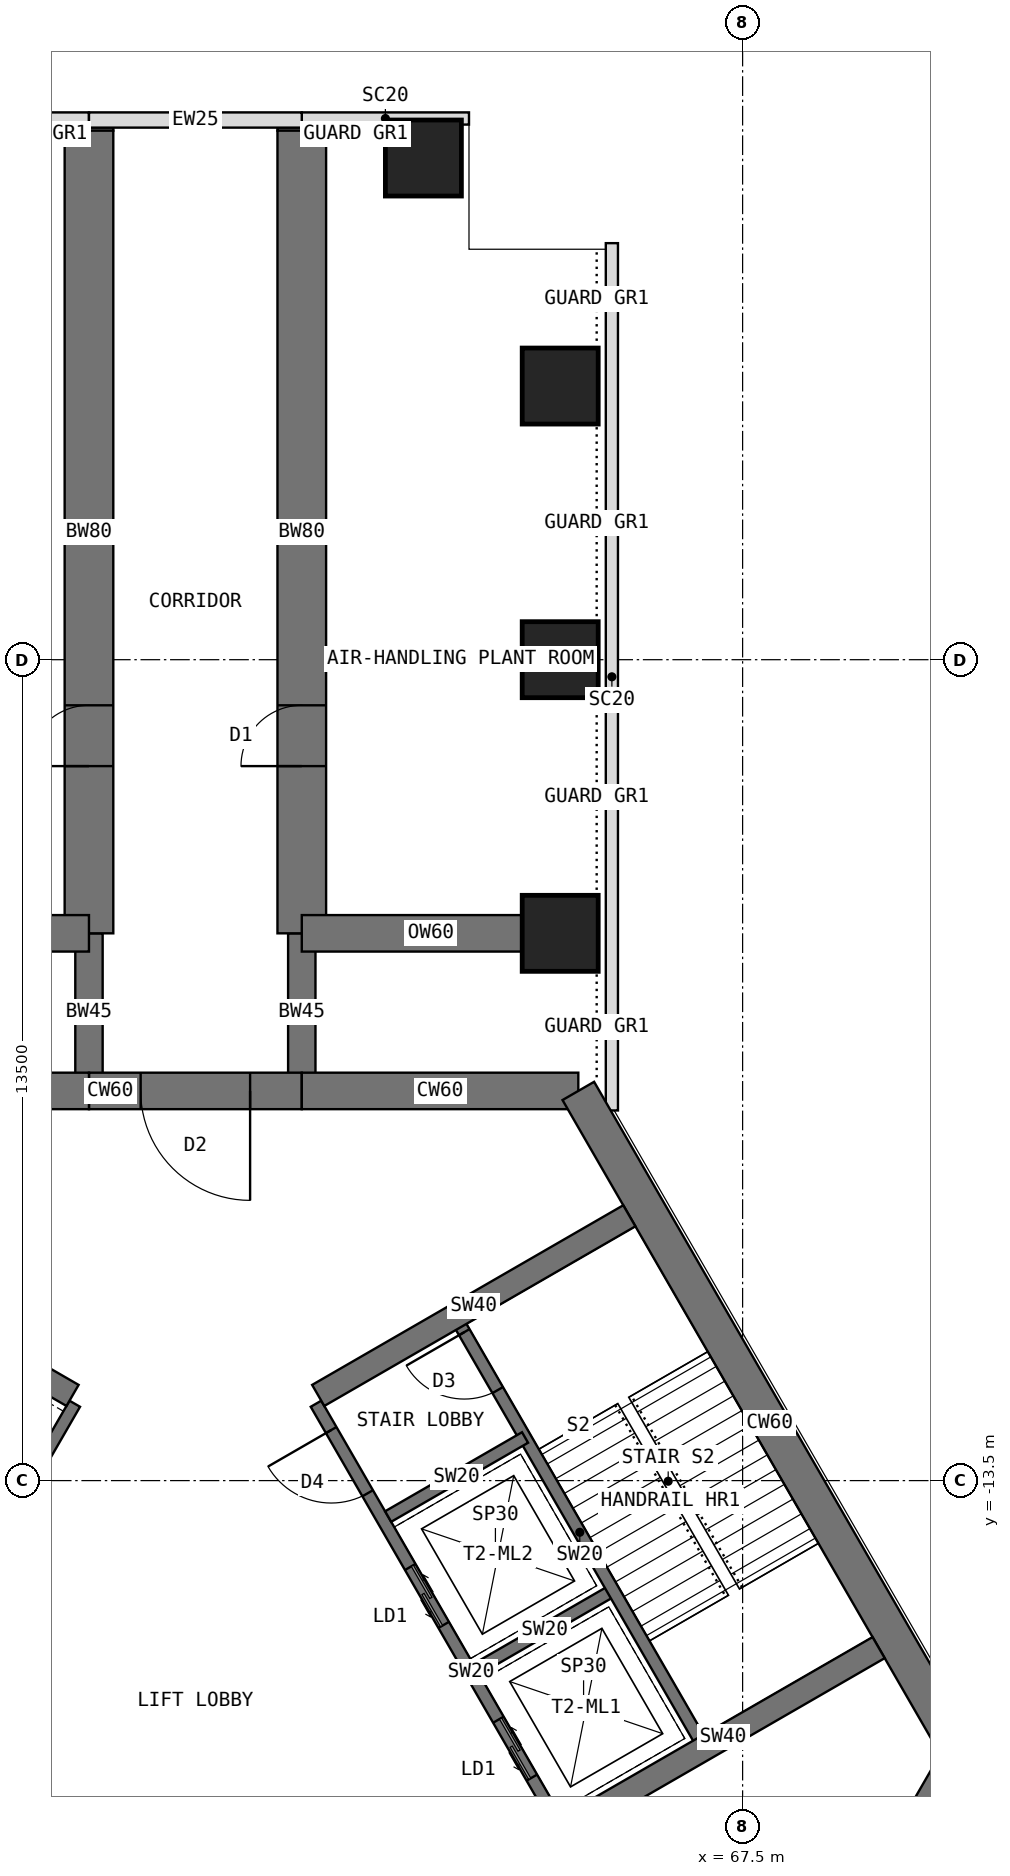
"""IFC4 building model, lengths in metres.
Left out: names, types, materials, properties, quantities, classifications, styles, units other than length and angle.
Written with IfcOpenShell. Run it as: python <this file> out.ifc"""

import sys

from ifc_helpers import new_model, si_unit, direction, frame, frame_2d, origin, origin_2d, place, context, subcontext, project, spatial, rectangle, extrude, element, fill, save


model = new_model("IFC4")
c1 = context("Model", 3, precision=1e-05, world=origin(), true_north=direction((0.0, 1.0)))
c2 = subcontext(c1, "Body", "Model", "MODEL_VIEW")
j1 = project(units=[si_unit("LENGTHUNIT", "METRE"), si_unit("PLANEANGLEUNIT", "RADIAN")], contexts=[c1])
p1 = place(None, origin())
s1 = spatial("IfcSite", under=j1, at=p1, CompositionType="ELEMENT")
p2 = place(p1, origin())
s2 = spatial("IfcBuilding", under=s1, at=p2, CompositionType="ELEMENT")
p3 = place(p2, frame((0.0, 0.0, 165.5)))
s3 = spatial("IfcBuildingStorey", under=s2, at=p3, CompositionType="ELEMENT", Elevation=165.5)
p4 = place(p3, frame((64.798, -7.092, 0.0), z_axis=(0.0, 0.0, 1.0), x_axis=(-1.0, 0.0, 0.0)))
e1 = element("IfcWall", 1, at=p4, inside=s3, PredefinedType="SHEAR", context=c2, shape_type="SweptSolid", body=[
    extrude(rectangle(XDim=4.548, YDim=0.6, at=frame_2d((2.274, 0.0))), origin(), (0.0, 0.0, 1.0), 5.0),
])
p5 = place(p3, frame((60.25, -7.092, 0.0), z_axis=(0.0, 0.0, 1.0), x_axis=(-1.0, 0.0, 0.0)))
e2 = element("IfcWall", 2, at=p5, inside=s3, PredefinedType="SHEAR", context=c2, shape_type="SweptSolid", body=[
    extrude(rectangle(XDim=3.5, YDim=0.6, at=frame_2d((1.75, 0.0))), origin(), (0.0, 0.0, 1.0), 5.0),
])
p6 = place(p5, frame((0.85, 0.0, 0.0)))
e3 = element("IfcOpeningElement", 3, at=p6, cuts=e2, PredefinedType="OPENING", context=c2, shape_type="SweptSolid", body=[
    extrude(rectangle(XDim=1.8, YDim=2.1, at=frame_2d((0.9, 1.05))), frame((0.0, 0.31, 0.0), z_axis=(0.0, -1.0, 0.0), x_axis=(1.0, 0.0, 0.0)), (0.0, 0.0, 1.0), 0.62),
])
p7 = place(p3, frame((56.75, -7.092, 0.0), z_axis=(0.0, 0.0, 1.0), x_axis=(-1.0, 0.0, 0.0)))
e4 = element("IfcWall", 4, at=p7, inside=s3, PredefinedType="SHEAR", context=c2, shape_type="SweptSolid", body=[
    extrude(rectangle(XDim=4.548, YDim=0.6, at=frame_2d((2.274, 0.0))), origin(), (0.0, 0.0, 1.0), 5.0),
])
p8 = place(p3, frame((68.822, -21.939, 0.0), z_axis=(0.0, 0.0, 1.0), x_axis=(0.500024481964, 0.866011268655, 0.0)))
e5 = element("IfcWall", 5, at=p8, inside=s3, PredefinedType="SHEAR", context=c2, shape_type="SweptSolid", body=[
    extrude(rectangle(XDim=4.548, YDim=0.6, at=frame_2d((2.274, 0.0))), origin(), (0.0, 0.0, 1.0), 5.0),
])
p9 = place(p3, frame((71.096, -18.0, 0.0), z_axis=(0.0, 0.0, 1.0), x_axis=(-0.500005998175, 0.866021940709, 0.0)))
e6 = element("IfcWall", 6, at=p9, inside=s3, PredefinedType="SHEAR", context=c2, shape_type="SweptSolid", body=[
    extrude(rectangle(XDim=12.596, YDim=0.6, at=frame_2d((6.298, 0.0))), origin(), (0.0, 0.0, 1.0), 5.0),
])
p10 = place(p3, frame((56.75, -7.092, 0.0), z_axis=(0.0, 0.0, 1.0), x_axis=(0.0, 1.0, 0.0)))
e7 = element("IfcWall", 7, at=p10, inside=s3, PredefinedType="SHEAR", context=c2, shape_type="SweptSolid", body=[
    extrude(rectangle(XDim=2.592, YDim=0.45, at=frame_2d((1.296, 0.0))), origin(), (0.0, 0.0, 1.0), 5.0),
])
p11 = place(p3, frame((56.75, -4.5, 0.0), z_axis=(0.0, 0.0, 1.0), x_axis=(0.0, 1.0, 0.0)))
e8 = element("IfcWall", 8, at=p11, inside=s3, PredefinedType="SHEAR", context=c2, shape_type="SweptSolid", body=[
    extrude(rectangle(XDim=13.2, YDim=0.8, at=frame_2d((6.6, 0.0))), origin(), (0.0, 0.0, 1.0), 5.0),
])
p12 = place(p11, frame((2.75, 0.0, 0.0)))
e9 = element("IfcOpeningElement", 9, at=p12, cuts=e8, PredefinedType="OPENING", context=c2, shape_type="SweptSolid", body=[
    extrude(rectangle(XDim=1.0, YDim=2.1, at=frame_2d((0.5, 1.05))), frame((0.0, 0.41, 0.0), z_axis=(0.0, -1.0, 0.0), x_axis=(1.0, 0.0, 0.0)), (0.0, 0.0, 1.0), 0.82),
])
p13 = place(p3, frame((60.25, -7.092, 0.0), z_axis=(0.0, 0.0, 1.0), x_axis=(0.0, 1.0, 0.0)))
e10 = element("IfcWall", 10, at=p13, inside=s3, PredefinedType="SHEAR", context=c2, shape_type="SweptSolid", body=[
    extrude(rectangle(XDim=2.592, YDim=0.45, at=frame_2d((1.296, 0.0))), origin(), (0.0, 0.0, 1.0), 5.0),
])
p14 = place(p3, frame((60.25, -4.5, 0.0), z_axis=(0.0, 0.0, 1.0), x_axis=(0.0, 1.0, 0.0)))
e11 = element("IfcWall", 11, at=p14, inside=s3, PredefinedType="SHEAR", context=c2, shape_type="SweptSolid", body=[
    extrude(rectangle(XDim=13.2, YDim=0.8, at=frame_2d((6.6, 0.0))), origin(), (0.0, 0.0, 1.0), 5.0),
])
p15 = place(p14, frame((2.75, 0.0, 0.0)))
e12 = element("IfcOpeningElement", 12, at=p15, cuts=e11, PredefinedType="OPENING", context=c2, shape_type="SweptSolid", body=[
    extrude(rectangle(XDim=1.0, YDim=2.1, at=frame_2d((0.5, 1.05))), frame((0.0, 0.41, 0.0), z_axis=(0.0, -1.0, 0.0), x_axis=(1.0, 0.0, 0.0)), (0.0, 0.0, 1.0), 0.82),
])
for number, where, z_axis, x_axis in (
    (13, (64.5, -4.5, 0.0), (0.0, 0.0, 1.0), (1.0, 0.0, 0.0)),
    (14, (64.5, 0.0, 0.0), (0.0, 0.0, 1.0), (1.0, 0.0, 0.0)),
    (15, (64.5, 4.5, 0.0), (0.0, 0.0, 1.0), (1.0, 0.0, 0.0)),
    (16, (62.25, 8.25, 0.0), (0.0, 0.0, 1.0), (1.0, 0.0, 0.0)),
):
    element("IfcColumn", number, at=place(p3, frame(where, z_axis=z_axis, x_axis=x_axis)), inside=s3, PredefinedType="COLUMN", context=c2, shape_type="SweptSolid", body=[
        extrude(rectangle(XDim=1.25, YDim=1.25, at=origin_2d()), origin(), (0.0, 0.0, 1.0), 5.0),
    ])
for number, where, z_axis, x_axis in (
    (17, (56.75, -4.5, 0.0), (0.0, 0.0, 1.0), (-1.0, 0.0, 0.0)),
    (18, (60.25, -4.5, 0.0), (0.0, 0.0, 1.0), (1.0, 0.0, 0.0)),
):
    element("IfcWall", number, at=place(p3, frame(where, z_axis=z_axis, x_axis=x_axis)), inside=s3, PredefinedType="SHEAR", context=c2, shape_type="SweptSolid", body=[
        extrude(rectangle(XDim=4.25, YDim=0.6, at=frame_2d((2.125, 0.0))), origin(), (0.0, 0.0, 1.0), 5.0),
    ])
p16 = place(p3, frame((65.35, 6.85, 0.0), z_axis=(0.0, 0.0, 1.0), x_axis=(0.0, -1.0, 0.0)))
e19 = element("IfcWall", 19, at=p16, inside=s3, PredefinedType="USERDEFINED", context=c2, shape_type="SweptSolid", body=[
    extrude(rectangle(XDim=14.263, YDim=0.2, at=frame_2d((7.131, 0.0))), origin(), (0.0, 0.0, 1.0), 4.8),
])
p17 = place(p3, frame((63.0, 8.9, 0.0), z_axis=(0.0, 0.0, 1.0), x_axis=(-1.0, 0.0, 0.0)))
e20 = element("IfcWall", 20, at=p17, inside=s3, PredefinedType="USERDEFINED", context=c2, shape_type="SweptSolid", body=[
    extrude(rectangle(XDim=2.75, YDim=0.2, at=frame_2d((1.375, 0.0))), origin(), (0.0, 0.0, 1.0), 4.8),
])
p18 = place(p3, frame((60.25, 8.875, 0.0), z_axis=(0.0, 0.0, 1.0), x_axis=(-1.0, 0.0, 0.0)))
e21 = element("IfcWall", 21, at=p18, inside=s3, PredefinedType="STANDARD", context=c2, shape_type="SweptSolid", body=[
    extrude(rectangle(XDim=3.5, YDim=0.25, at=frame_2d((1.75, 0.0))), origin(), (0.0, 0.0, 1.0), 4.8),
])
p19 = place(p3, frame((56.75, 8.9, 0.0), z_axis=(0.0, 0.0, 1.0), x_axis=(-1.0, 0.0, 0.0)))
e22 = element("IfcWall", 22, at=p19, inside=s3, PredefinedType="USERDEFINED", context=c2, shape_type="SweptSolid", body=[
    extrude(rectangle(XDim=2.75, YDim=0.2, at=frame_2d((1.375, 0.0))), origin(), (0.0, 0.0, 1.0), 4.8),
])
for number, where, z_axis, x_axis in (
    (23, (56.75, 8.7, 0.0), (0.0, 0.0, 1.0), (0.0, 1.0, 0.0)),
    (24, (60.25, 8.7, 0.0), (0.0, 0.0, 1.0), (0.0, 1.0, 0.0)),
):
    element("IfcWall", number, at=place(p3, frame(where, z_axis=z_axis, x_axis=x_axis)), inside=s3, PredefinedType="PARTITIONING", context=c2, shape_type="SweptSolid", body=[
        extrude(rectangle(XDim=0.05, YDim=0.8, at=frame_2d((0.025, 0.0))), origin(), (0.0, 0.0, 1.0), 4.8),
    ])
p20 = place(p3, frame((56.516, -12.236, 0.0), z_axis=(0.0, 0.0, 1.0), x_axis=(-0.49999894854, -0.866026010844, 0.0)))
e25 = element("IfcWall", 25, at=p20, inside=s3, PredefinedType="SHEAR", context=c2, shape_type="SweptSolid", body=[
    extrude(rectangle(XDim=8.0, YDim=0.2, at=frame_2d((4.0, 0.0))), origin(), (0.0, 0.0, 1.0), 5.0),
])
p21 = place(p20, frame((6.3, 0.0, 0.0)))
e26 = element("IfcOpeningElement", 26, at=p21, cuts=e25, PredefinedType="OPENING", context=c2, shape_type="SweptSolid", body=[
    extrude(rectangle(XDim=1.2, YDim=2.1, at=frame_2d((0.6, 1.05))), frame((0.0, 0.11, 0.0), z_axis=(0.0, -1.0, 0.0), x_axis=(1.0, 0.0, 0.0)), (0.0, 0.0, 1.0), 0.22),
])
p22 = place(p3, frame((56.48, -12.099, 0.0), z_axis=(0.0, 0.0, 1.0), x_axis=(-0.866009424208, 0.500027676417, 0.0)))
e27 = element("IfcWall", 27, at=p22, inside=s3, PredefinedType="SHEAR", context=c2, shape_type="SweptSolid", body=[
    extrude(rectangle(XDim=5.908, YDim=0.4, at=frame_2d((2.954, 0.0))), origin(), (0.0, 0.0, 1.0), 5.0),
])
p23 = place(p3, frame((64.484, -19.164, 0.0), z_axis=(0.0, 0.0, 1.0), x_axis=(-0.49999894854, 0.866026010844, 0.0)))
e28 = element("IfcWall", 28, at=p23, inside=s3, PredefinedType="SHEAR", context=c2, shape_type="SweptSolid", body=[
    extrude(rectangle(XDim=8.0, YDim=0.2, at=frame_2d((4.0, 0.0))), origin(), (0.0, 0.0, 1.0), 5.0),
])
p24 = place(p23, frame((6.3, 0.0, 0.0)))
e29 = element("IfcOpeningElement", 29, at=p24, cuts=e28, PredefinedType="OPENING", context=c2, shape_type="SweptSolid", body=[
    extrude(rectangle(XDim=1.2, YDim=2.1, at=frame_2d((0.6, 1.05))), frame((0.0, 0.11, 0.0), z_axis=(0.0, -1.0, 0.0), x_axis=(1.0, 0.0, 0.0)), (0.0, 0.0, 1.0), 0.22),
])
p25 = place(p23, frame((0.9, 0.0, 0.0)))
e30 = element("IfcOpeningElement", 30, at=p25, cuts=e28, PredefinedType="OPENING", context=c2, shape_type="SweptSolid", body=[
    extrude(rectangle(XDim=1.1, YDim=2.2, at=frame_2d((0.55, 1.1))), frame((0.0, 0.11, 0.0), z_axis=(0.0, -1.0, 0.0), x_axis=(1.0, 0.0, 0.0)), (0.0, 0.0, 1.0), 0.22),
])
p26 = place(p23, frame((3.8, 0.0, 0.0)))
e31 = element("IfcOpeningElement", 31, at=p26, cuts=e28, PredefinedType="OPENING", context=c2, shape_type="SweptSolid", body=[
    extrude(rectangle(XDim=1.1, YDim=2.2, at=frame_2d((0.55, 1.1))), frame((0.0, 0.11, 0.0), z_axis=(0.0, -1.0, 0.0), x_axis=(1.0, 0.0, 0.0)), (0.0, 0.0, 1.0), 0.22),
])
p27 = place(p3, frame((63.12, -16.603, 0.0), z_axis=(0.0, 0.0, 1.0), x_axis=(0.866062058628, 0.499936506574, 0.0)))
e32 = element("IfcWall", 32, at=p27, inside=s3, PredefinedType="SHEAR", context=c2, shape_type="SweptSolid", body=[
    extrude(rectangle(XDim=2.6, YDim=0.2, at=frame_2d((1.3, 0.0))), origin(), (0.0, 0.0, 1.0), 5.0),
])
p28 = place(p3, frame((61.67, -14.091, 0.0), z_axis=(0.0, 0.0, 1.0), x_axis=(0.86603858612, 0.49997716683, 0.0)))
e33 = element("IfcWall", 33, at=p28, inside=s3, PredefinedType="SHEAR", context=c2, shape_type="SweptSolid", body=[
    extrude(rectangle(XDim=2.6, YDim=0.2, at=frame_2d((1.3, 0.0))), origin(), (0.0, 0.0, 1.0), 5.0),
])
p29 = place(p3, frame((66.822, -17.814, 0.0), z_axis=(0.0, 0.0, 1.0), x_axis=(-0.49999894854, 0.866026010844, 0.0)))
e34 = element("IfcWall", 34, at=p29, inside=s3, PredefinedType="SHEAR", context=c2, shape_type="SweptSolid", body=[
    extrude(rectangle(XDim=8.0, YDim=0.2, at=frame_2d((4.0, 0.0))), origin(), (0.0, 0.0, 1.0), 5.0),
])
p30 = place(p29, frame((6.7, 0.0, 0.0)))
e35 = element("IfcOpeningElement", 35, at=p30, cuts=e34, PredefinedType="OPENING", context=c2, shape_type="SweptSolid", body=[
    extrude(rectangle(XDim=1.1, YDim=2.1, at=frame_2d((0.55, 1.05))), frame((0.0, 0.11, 0.0), z_axis=(0.0, -1.0, 0.0), x_axis=(1.0, 0.0, 0.0)), (0.0, 0.0, 1.0), 0.22),
])
p31 = place(p3, frame((60.52, -12.099, 0.0), z_axis=(0.0, 0.0, 1.0), x_axis=(0.866009424208, 0.500027676417, 0.0)))
e36 = element("IfcWall", 36, at=p31, inside=s3, PredefinedType="SHEAR", context=c2, shape_type="SweptSolid", body=[
    extrude(rectangle(XDim=5.908, YDim=0.4, at=frame_2d((2.954, 0.0))), origin(), (0.0, 0.0, 1.0), 5.0),
])
p32 = place(p3, frame((64.62, -19.201, 0.0), z_axis=(0.0, 0.0, 1.0), x_axis=(0.866027317282, 0.49999668571, 0.0)))
e37 = element("IfcWall", 37, at=p32, inside=s3, PredefinedType="SHEAR", context=c2, shape_type="SweptSolid", body=[
    extrude(rectangle(XDim=5.908, YDim=0.4, at=frame_2d((2.954, 0.0))), origin(), (0.0, 0.0, 1.0), 5.0),
])
p33 = place(p24, origin())
e38 = element("IfcDoor", 38, at=p33, inside=s3, OperationType="SINGLE_SWING_RIGHT", PredefinedType="DOOR", context=c2, shape_type="SweptSolid", body=[
    extrude(rectangle(XDim=1.2, YDim=2.1, at=frame_2d((0.6, 1.05))), frame((0.0, 0.025, 0.0), z_axis=(0.0, -1.0, 0.0), x_axis=(1.0, 0.0, 0.0)), (0.0, 0.0, 1.0), 0.05),
])
fill(e29, e38)
p34 = place(p25, origin())
e39 = element("IfcDoor", 39, at=p34, inside=s3, OperationType="DOUBLE_DOOR_SLIDING", PredefinedType="DOOR", context=c2, shape_type="SweptSolid", body=[
    extrude(rectangle(XDim=1.1, YDim=2.2, at=frame_2d((0.55, 1.1))), frame((0.0, 0.025, 0.0), z_axis=(0.0, -1.0, 0.0), x_axis=(1.0, 0.0, 0.0)), (0.0, 0.0, 1.0), 0.05),
])
fill(e30, e39)
p35 = place(p26, origin())
e40 = element("IfcDoor", 40, at=p35, inside=s3, OperationType="DOUBLE_DOOR_SLIDING", PredefinedType="DOOR", context=c2, shape_type="SweptSolid", body=[
    extrude(rectangle(XDim=1.1, YDim=2.2, at=frame_2d((0.55, 1.1))), frame((0.0, 0.025, 0.0), z_axis=(0.0, -1.0, 0.0), x_axis=(1.0, 0.0, 0.0)), (0.0, 0.0, 1.0), 0.05),
])
fill(e31, e40)
p36 = place(p30, origin())
e41 = element("IfcDoor", 41, at=p36, inside=s3, OperationType="SINGLE_SWING_RIGHT", PredefinedType="DOOR", context=c2, shape_type="SweptSolid", body=[
    extrude(rectangle(XDim=1.1, YDim=2.1, at=frame_2d((0.55, 1.05))), frame((0.0, 0.025, 0.0), z_axis=(0.0, -1.0, 0.0), x_axis=(1.0, 0.0, 0.0)), (0.0, 0.0, 1.0), 0.05),
])
fill(e35, e41)
p37 = place(p6, origin())
e42 = element("IfcDoor", 42, at=p37, inside=s3, OperationType="DOUBLE_DOOR_DOUBLE_SWING", PredefinedType="DOOR", context=c2, shape_type="SweptSolid", body=[
    extrude(rectangle(XDim=1.72, YDim=2.06, at=frame_2d((0.9, 1.03))), frame((0.0, 0.025, 0.0), z_axis=(0.0, -1.0, 0.0), x_axis=(1.0, 0.0, 0.0)), (0.0, 0.0, 1.0), 0.05),
    extrude(rectangle(XDim=0.04, YDim=2.1, at=frame_2d((0.02, 1.05))), frame((0.0, 0.3, 0.0), z_axis=(0.0, -1.0, 0.0), x_axis=(1.0, 0.0, 0.0)), (0.0, 0.0, 1.0), 0.6),
    extrude(rectangle(XDim=0.04, YDim=2.1, at=frame_2d((1.78, 1.05))), frame((0.0, 0.3, 0.0), z_axis=(0.0, -1.0, 0.0), x_axis=(1.0, 0.0, 0.0)), (0.0, 0.0, 1.0), 0.6),
    extrude(rectangle(XDim=1.72, YDim=0.04, at=frame_2d((0.9, 2.08))), frame((0.0, 0.3, 0.0), z_axis=(0.0, -1.0, 0.0), x_axis=(1.0, 0.0, 0.0)), (0.0, 0.0, 1.0), 0.6),
])
fill(e3, e42)
p38 = place(p12, origin())
e43 = element("IfcDoor", 43, at=p38, inside=s3, OperationType="SINGLE_SWING_LEFT", PredefinedType="DOOR", context=c2, shape_type="SweptSolid", body=[
    extrude(rectangle(XDim=0.92, YDim=2.06, at=frame_2d((0.5, 1.03))), frame((0.0, 0.025, 0.0), z_axis=(0.0, -1.0, 0.0), x_axis=(1.0, 0.0, 0.0)), (0.0, 0.0, 1.0), 0.05),
    extrude(rectangle(XDim=0.04, YDim=2.1, at=frame_2d((0.02, 1.05))), frame((0.0, 0.4, 0.0), z_axis=(0.0, -1.0, 0.0), x_axis=(1.0, 0.0, 0.0)), (0.0, 0.0, 1.0), 0.8),
    extrude(rectangle(XDim=0.04, YDim=2.1, at=frame_2d((0.98, 1.05))), frame((0.0, 0.4, 0.0), z_axis=(0.0, -1.0, 0.0), x_axis=(1.0, 0.0, 0.0)), (0.0, 0.0, 1.0), 0.8),
    extrude(rectangle(XDim=0.92, YDim=0.04, at=frame_2d((0.5, 2.08))), frame((0.0, 0.4, 0.0), z_axis=(0.0, -1.0, 0.0), x_axis=(1.0, 0.0, 0.0)), (0.0, 0.0, 1.0), 0.8),
])
fill(e9, e43)
p39 = place(p15, origin())
e44 = element("IfcDoor", 44, at=p39, inside=s3, OperationType="SINGLE_SWING_LEFT", PredefinedType="DOOR", context=c2, shape_type="SweptSolid", body=[
    extrude(rectangle(XDim=0.92, YDim=2.06, at=frame_2d((0.5, 1.03))), frame((0.0, 0.025, 0.0), z_axis=(0.0, -1.0, 0.0), x_axis=(1.0, 0.0, 0.0)), (0.0, 0.0, 1.0), 0.05),
    extrude(rectangle(XDim=0.04, YDim=2.1, at=frame_2d((0.02, 1.05))), frame((0.0, 0.4, 0.0), z_axis=(0.0, -1.0, 0.0), x_axis=(1.0, 0.0, 0.0)), (0.0, 0.0, 1.0), 0.8),
    extrude(rectangle(XDim=0.04, YDim=2.1, at=frame_2d((0.98, 1.05))), frame((0.0, 0.4, 0.0), z_axis=(0.0, -1.0, 0.0), x_axis=(1.0, 0.0, 0.0)), (0.0, 0.0, 1.0), 0.8),
    extrude(rectangle(XDim=0.92, YDim=0.04, at=frame_2d((0.5, 2.08))), frame((0.0, 0.4, 0.0), z_axis=(0.0, -1.0, 0.0), x_axis=(1.0, 0.0, 0.0)), (0.0, 0.0, 1.0), 0.8),
])
fill(e12, e44)
save(model, sys.argv[1])
